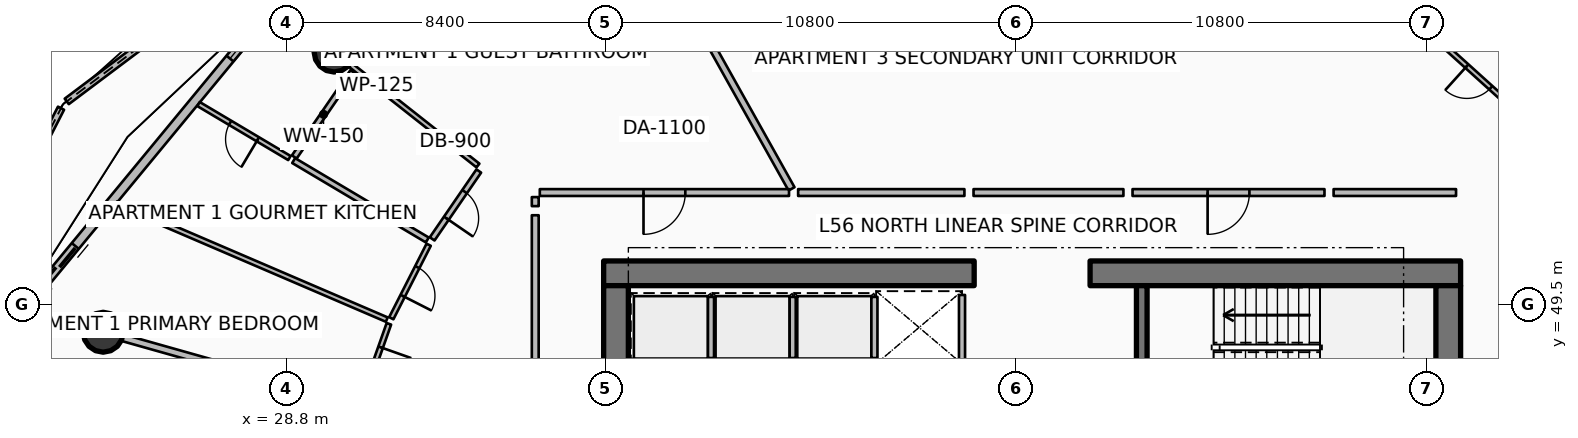
"""IFC4 building model, lengths in metres.
Left out: names, types, materials, properties, quantities, classifications, styles, units other than length and angle.
Written with IfcOpenShell. Run it as: python <this file> out.ifc"""

import sys

from ifc_helpers import new_model, si_unit, direction, frame, frame_2d, origin, origin_2d, place, context, subcontext, project, spatial, polyline, rectangle, circle, outline, extrude, element, fill, save


model = new_model("IFC4")
c1 = context("Model", 3, precision=1e-05, world=origin(), true_north=direction((0.0, 1.0)))
c2 = subcontext(c1, "Body", "Model", "MODEL_VIEW")
j1 = project(units=[si_unit("LENGTHUNIT", "METRE"), si_unit("PLANEANGLEUNIT", "RADIAN")], contexts=[c1])
p1 = place(None, origin())
s1 = spatial("IfcSite", under=j1, at=p1, CompositionType="ELEMENT")
p2 = place(p1, origin())
s2 = spatial("IfcBuilding", under=s1, at=p2, CompositionType="ELEMENT")
p3 = place(p2, frame((0.0, 0.0, 221.55)))
s3 = spatial("IfcBuildingStorey", under=s2, at=p3, CompositionType="ELEMENT", Elevation=221.55)
for number, where, z_axis, x_axis in (
    (1, (37.15, 50.325, 0.0), (0.0, 0.0, 1.0), (1.0, 0.0, 0.0)),
    (2, (49.95, 50.325, 0.0), (0.0, 0.0, 1.0), (1.0, 0.0, 0.0)),
):
    element("IfcWall", number, at=place(p3, frame(where, z_axis=z_axis, x_axis=x_axis)), inside=s3, PredefinedType="SHEAR", context=c2, shape_type="SweptSolid", body=[
        extrude(rectangle(XDim=9.75, YDim=0.65, at=frame_2d((4.875, 0.0))), origin(), (0.0, 0.0, 1.0), 3.75),
    ])
for number, where, z_axis, x_axis in (
    (3, (37.475, 34.0, 0.0), (0.0, 0.0, 1.0), (0.0, 1.0, 0.0)),
    (4, (59.375, 34.0, 0.0), (0.0, 0.0, 1.0), (0.0, 1.0, 0.0)),
):
    element("IfcWall", number, at=place(p3, frame(where, z_axis=z_axis, x_axis=x_axis)), inside=s3, PredefinedType="SHEAR", context=c2, shape_type="SweptSolid", body=[
        extrude(rectangle(XDim=16.0, YDim=0.65, at=frame_2d((8.0, 0.0))), origin(), (0.0, 0.0, 1.0), 3.75),
    ])
p4 = place(p3, frame((51.31, 46.5, 0.0), z_axis=(0.0, 0.0, 1.0), x_axis=(0.0, 1.0, 0.0)))
e5 = element("IfcWall", 5, at=p4, inside=s3, PredefinedType="SHEAR", context=c2, shape_type="SweptSolid", body=[
    extrude(rectangle(XDim=3.5, YDim=0.28, at=frame_2d((1.75, 0.0))), origin(), (0.0, 0.0, 1.0), 3.75),
])
p5 = place(p3, frame((30.056, 56.146, 0.0), z_axis=(-0.208518335243, 0.164359117207, 0.964109010672), x_axis=(-0.619039399449, -0.785359931452, 0.0)))
e6 = element("IfcColumn", 6, at=p5, inside=s3, PredefinedType="COLUMN", context=c2, shape_type="SweptSolid", body=[
    extrude(circle(Radius=0.525, at=origin_2d()), origin(), (0.0, 0.0, 1.0), 3.599),
])
p6 = place(p3, frame((23.98, 48.774, 0.0), z_axis=(-0.277251706749, 0.078156009679, 0.957613246178), x_axis=(-0.271321276561, -0.962488838837, 0.0)))
e7 = element("IfcColumn", 7, at=p6, inside=s3, PredefinedType="COLUMN", context=c2, shape_type="SweptSolid", body=[
    extrude(circle(Radius=0.525, at=origin_2d()), origin(), (0.0, 0.0, 1.0), 3.624),
])
p7 = place(p3, frame((31.432, 61.16, 0.0), z_axis=(0.0, 0.0, 1.0), x_axis=(-0.799768695593, -0.600308282093, 0.0)))
e8 = element("IfcWall", 8, at=p7, inside=s3, PredefinedType="PARAPET", context=c2, shape_type="SweptSolid", body=[
    extrude(outline(polyline([(0.0, 0.0), (10.515, 0.0), (10.515, 1.348), (5.258, 1.182), (0.0, 1.12), (0.0, 0.0)])), frame((0.0, 0.09, 0.0), z_axis=(0.0, -1.0, 0.0), x_axis=(1.0, 0.0, 0.0)), (0.0, 0.0, 1.0), 0.18),
])
p8 = place(p3, frame((22.871, 54.669, 0.0), z_axis=(0.0, 0.0, 1.0), x_axis=(-0.456201330326, -0.889876590437, 0.0)))
e9 = element("IfcWall", 9, at=p8, inside=s3, PredefinedType="PARAPET", context=c2, shape_type="SweptSolid", body=[
    extrude(outline(polyline([(0.0, 0.0), (11.347, 0.0), (11.347, 1.747), (5.674, 1.562), (0.0, 1.348), (0.0, 0.0)])), frame((0.0, 0.09, 0.0), z_axis=(0.0, -1.0, 0.0), x_axis=(1.0, 0.0, 0.0)), (0.0, 0.0, 1.0), 0.18),
])
p9 = place(p3, frame((28.515, 57.424, 0.0), z_axis=(0.0, 0.0, 1.0), x_axis=(-0.636759394418, -0.771062561418, 0.0)))
e10 = element("IfcWall", 10, at=p9, inside=s3, PredefinedType="SOLIDWALL", context=c2, shape_type="SweptSolid", body=[
    extrude(rectangle(XDim=10.494, YDim=0.24, at=frame_2d((5.247, 0.0))), origin(), (0.0, 0.0, 1.0), 2.42),
])
p10 = place(p9, frame((8.274, 0.0, 0.0)))
e11 = element("IfcOpeningElement", 11, at=p10, cuts=e10, PredefinedType="OPENING", context=c2, shape_type="SweptSolid", body=[
    extrude(rectangle(XDim=1.45, YDim=2.15, at=frame_2d((0.725, 1.075))), frame((0.0, 0.13, 0.0), z_axis=(0.0, -1.0, 0.0), x_axis=(1.0, 0.0, 0.0)), (0.0, 0.0, 1.0), 0.26),
])
p11 = place(p9, frame((0.28, 0.0, 0.65)))
e12 = element("IfcOpeningElement", 12, at=p11, cuts=e10, PredefinedType="OPENING", context=c2, shape_type="SweptSolid", body=[
    extrude(rectangle(XDim=1.6, YDim=1.5, at=frame_2d((0.8, 0.75))), frame((0.0, 0.13, 0.0), z_axis=(0.0, -1.0, 0.0), x_axis=(1.0, 0.0, 0.0)), (0.0, 0.0, 1.0), 0.26),
])
p12 = place(p3, frame((39.975, 47.995, 0.0), z_axis=(0.0, 0.0, 1.0), x_axis=(-1.0, 0.0, 0.0)))
e13 = element("IfcWall", 13, at=p12, inside=s3, PredefinedType="PARTITIONING", context=c2, shape_type="SweptSolid", body=[
    extrude(rectangle(XDim=2.11, YDim=0.16, at=frame_2d((1.055, 0.0))), origin(), (0.0, 0.0, 1.0), 3.47),
])
p13 = place(p12, frame((0.505, 0.0, 0.0)))
e14 = element("IfcOpeningElement", 14, at=p13, cuts=e13, PredefinedType="OPENING", context=c2, shape_type="SweptSolid", body=[
    extrude(rectangle(XDim=1.1, YDim=2.1, at=frame_2d((0.55, 1.05))), frame((0.0, 0.09, 0.0), z_axis=(0.0, -1.0, 0.0), x_axis=(1.0, 0.0, 0.0)), (0.0, 0.0, 1.0), 0.18),
])
p14 = place(p3, frame((39.975, 48.095, 0.0), z_axis=(0.0, 0.0, 1.0), x_axis=(0.0, 1.0, 0.0)))
e15 = element("IfcWall", 15, at=p14, inside=s3, PredefinedType="PARTITIONING", context=c2, shape_type="SweptSolid", body=[
    extrude(rectangle(XDim=1.61, YDim=0.16, at=frame_2d((0.805, 0.0))), origin(), (0.0, 0.0, 1.0), 3.47),
])
p15 = place(p3, frame((42.125, 47.995, 0.0), z_axis=(0.0, 0.0, 1.0), x_axis=(-1.0, 0.0, 0.0)))
e16 = element("IfcWall", 16, at=p15, inside=s3, PredefinedType="PARTITIONING", context=c2, shape_type="SweptSolid", body=[
    extrude(rectangle(XDim=2.11, YDim=0.16, at=frame_2d((1.055, 0.0))), origin(), (0.0, 0.0, 1.0), 3.47),
])
p16 = place(p15, frame((0.505, 0.0, 0.0)))
e17 = element("IfcOpeningElement", 17, at=p16, cuts=e16, PredefinedType="OPENING", context=c2, shape_type="SweptSolid", body=[
    extrude(rectangle(XDim=1.1, YDim=2.1, at=frame_2d((0.55, 1.05))), frame((0.0, 0.09, 0.0), z_axis=(0.0, -1.0, 0.0), x_axis=(1.0, 0.0, 0.0)), (0.0, 0.0, 1.0), 0.18),
])
p17 = place(p3, frame((42.125, 48.095, 0.0), z_axis=(0.0, 0.0, 1.0), x_axis=(0.0, 1.0, 0.0)))
e18 = element("IfcWall", 18, at=p17, inside=s3, PredefinedType="PARTITIONING", context=c2, shape_type="SweptSolid", body=[
    extrude(rectangle(XDim=1.61, YDim=0.16, at=frame_2d((0.805, 0.0))), origin(), (0.0, 0.0, 1.0), 3.47),
])
p18 = place(p3, frame((44.275, 47.995, 0.0), z_axis=(0.0, 0.0, 1.0), x_axis=(-1.0, 0.0, 0.0)))
e19 = element("IfcWall", 19, at=p18, inside=s3, PredefinedType="PARTITIONING", context=c2, shape_type="SweptSolid", body=[
    extrude(rectangle(XDim=2.11, YDim=0.16, at=frame_2d((1.055, 0.0))), origin(), (0.0, 0.0, 1.0), 3.47),
])
p19 = place(p18, frame((0.505, 0.0, 0.0)))
e20 = element("IfcOpeningElement", 20, at=p19, cuts=e19, PredefinedType="OPENING", context=c2, shape_type="SweptSolid", body=[
    extrude(rectangle(XDim=1.1, YDim=2.1, at=frame_2d((0.55, 1.05))), frame((0.0, 0.09, 0.0), z_axis=(0.0, -1.0, 0.0), x_axis=(1.0, 0.0, 0.0)), (0.0, 0.0, 1.0), 0.18),
])
p20 = place(p3, frame((44.275, 48.095, 0.0), z_axis=(0.0, 0.0, 1.0), x_axis=(0.0, 1.0, 0.0)))
e21 = element("IfcWall", 21, at=p20, inside=s3, PredefinedType="PARTITIONING", context=c2, shape_type="SweptSolid", body=[
    extrude(rectangle(XDim=1.61, YDim=0.16, at=frame_2d((0.805, 0.0))), origin(), (0.0, 0.0, 1.0), 3.47),
])
p21 = place(p3, frame((46.58, 48.045, 0.0), z_axis=(0.0, 0.0, 1.0), x_axis=(0.0, 1.0, 0.0)))
e22 = element("IfcWall", 22, at=p21, inside=s3, PredefinedType="PARTITIONING", context=c2, shape_type="SweptSolid", body=[
    extrude(rectangle(XDim=1.71, YDim=0.16, at=frame_2d((0.855, 0.0))), origin(), (0.0, 0.0, 1.0), 3.47),
])
p22 = place(p3, frame((42.094, 52.546, 0.0), z_axis=(0.0, 0.0, 1.0), x_axis=(-0.488614041717, 0.872500039104, 0.0)))
e23 = element("IfcWall", 23, at=p22, inside=s3, PredefinedType="PARTITIONING", context=c2, shape_type="SweptSolid", body=[
    extrude(rectangle(XDim=10.448, YDim=0.18, at=frame_2d((5.224, 0.0))), origin(), (0.0, 0.0, 1.0), 2.427),
])
p23 = place(p3, frame((35.244, 45.598, 0.0), z_axis=(0.0, 0.0, 1.0), x_axis=(-0.962456561262, 0.271435752405, 0.0)))
e24 = element("IfcWall", 24, at=p23, inside=s3, PredefinedType="PARTITIONING", context=c2, shape_type="SweptSolid", body=[
    extrude(rectangle(XDim=13.777, YDim=0.18, at=frame_2d((6.888, 0.0))), origin(), (0.0, 0.0, 1.0), 2.427),
])
p24 = place(p3, frame((42.028, 52.45, 0.0), z_axis=(0.0, 0.0, 1.0), x_axis=(-1.0, 0.0, 0.0)))
e25 = element("IfcWall", 25, at=p24, inside=s3, PredefinedType="PARTITIONING", context=c2, shape_type="SweptSolid", body=[
    extrude(rectangle(XDim=6.558, YDim=0.18, at=frame_2d((3.279, 0.0))), origin(), (0.0, 0.0, 1.0), 2.427),
])
p25 = place(p24, frame((2.729, 0.0, 0.0)))
e26 = element("IfcOpeningElement", 26, at=p25, cuts=e25, PredefinedType="OPENING", context=c2, shape_type="SweptSolid", body=[
    extrude(rectangle(XDim=1.1, YDim=2.1, at=frame_2d((0.55, 1.05))), frame((0.0, 0.1, 0.0), z_axis=(0.0, -1.0, 0.0), x_axis=(1.0, 0.0, 0.0)), (0.0, 0.0, 1.0), 0.2),
])
p26 = place(p3, frame((35.35, 52.33, 0.0), z_axis=(0.0, 0.0, 1.0), x_axis=(0.0, -1.0, 0.0)))
e27 = element("IfcWall", 27, at=p26, inside=s3, PredefinedType="PARTITIONING", context=c2, shape_type="SweptSolid", body=[
    extrude(rectangle(XDim=0.238, YDim=0.18, at=frame_2d((0.119, 0.0))), origin(), (0.0, 0.0, 1.0), 2.427),
])
p27 = place(p3, frame((35.35, 51.853, 0.0), z_axis=(0.0, 0.0, 1.0), x_axis=(0.0, -1.0, 0.0)))
e28 = element("IfcWall", 28, at=p27, inside=s3, PredefinedType="PARTITIONING", context=c2, shape_type="SweptSolid", body=[
    extrude(rectangle(XDim=6.165, YDim=0.18, at=frame_2d((3.083, 0.0))), origin(), (0.0, 0.0, 1.0), 2.427),
])
p28 = place(p3, frame((33.842, 53.161, 0.0), z_axis=(0.0, 0.0, 1.0), x_axis=(-0.785311801239, 0.619100456173, 0.0)))
e29 = element("IfcWall", 29, at=p28, inside=s3, PredefinedType="PARTITIONING", context=c2, shape_type="SweptSolid", body=[
    extrude(rectangle(XDim=6.799, YDim=0.125, at=frame_2d((3.4, 0.0))), origin(), (0.0, 0.0, 1.0), 2.427),
])
p29 = place(p3, frame((33.864, 53.017, 0.0), z_axis=(0.0, 0.0, 1.0), x_axis=(-0.56614137875, -0.824308157953, 0.0)))
e30 = element("IfcWall", 30, at=p29, inside=s3, PredefinedType="PARTITIONING", context=c2, shape_type="SweptSolid", body=[
    extrude(rectangle(XDim=2.167, YDim=0.15, at=frame_2d((1.083, 0.0))), origin(), (0.0, 0.0, 1.0), 2.427),
])
p30 = place(p29, frame((0.658, 0.0, 0.0)))
e31 = element("IfcOpeningElement", 31, at=p30, cuts=e30, PredefinedType="OPENING", context=c2, shape_type="SweptSolid", body=[
    extrude(rectangle(XDim=0.85, YDim=2.06, at=frame_2d((0.425, 1.03))), frame((0.0, 0.085, 0.0), z_axis=(0.0, -1.0, 0.0), x_axis=(1.0, 0.0, 0.0)), (0.0, 0.0, 1.0), 0.17),
])
p31 = place(p3, frame((30.55, 55.629, 0.0), z_axis=(0.0, 0.0, 1.0), x_axis=(-0.566136620745, -0.824311425768, 0.0)))
e32 = element("IfcWall", 32, at=p31, inside=s3, PredefinedType="PARTITIONING", context=c2, shape_type="SweptSolid", body=[
    extrude(rectangle(XDim=2.721, YDim=0.15, at=frame_2d((1.361, 0.0))), origin(), (0.0, 0.0, 1.0), 2.427),
])
p32 = place(p3, frame((32.509, 51.202, 0.0), z_axis=(0.0, 0.0, 1.0), x_axis=(-0.859744174922, 0.510724929573, 0.0)))
e33 = element("IfcWall", 33, at=p32, inside=s3, PredefinedType="PARTITIONING", context=c2, shape_type="SweptSolid", body=[
    extrude(rectangle(XDim=4.09, YDim=0.15, at=frame_2d((2.045, 0.0))), origin(), (0.0, 0.0, 1.0), 2.91),
])
p33 = place(p3, frame((28.881, 53.358, 0.0), z_axis=(0.0, 0.0, 1.0), x_axis=(-0.859746342612, 0.51072128051, 0.0)))
e34 = element("IfcWall", 34, at=p33, inside=s3, PredefinedType="PARTITIONING", context=c2, shape_type="SweptSolid", body=[
    extrude(rectangle(XDim=2.781, YDim=0.125, at=frame_2d((1.391, 0.0))), origin(), (0.0, 0.0, 1.0), 2.445),
])
p34 = place(p33, frame((0.966, 0.0, 0.0)))
e35 = element("IfcOpeningElement", 35, at=p34, cuts=e34, PredefinedType="OPENING", context=c2, shape_type="SweptSolid", body=[
    extrude(rectangle(XDim=0.85, YDim=2.06, at=frame_2d((0.425, 1.03))), frame((0.0, 0.073, 0.0), z_axis=(0.0, -1.0, 0.0), x_axis=(1.0, 0.0, 0.0)), (0.0, 0.0, 1.0), 0.145),
])
p35 = place(p3, frame((31.443, 49.107, 0.0), z_axis=(0.0, 0.0, 1.0), x_axis=(-0.918923160155, 0.394436592789, 0.0)))
e36 = element("IfcWall", 36, at=p35, inside=s3, PredefinedType="PARTITIONING", context=c2, shape_type="SweptSolid", body=[
    extrude(rectangle(XDim=7.746, YDim=0.125, at=frame_2d((3.873, 0.0))), origin(), (0.0, 0.0, 1.0), 2.445),
])
p36 = place(p3, frame((32.546, 51.076, 0.0), z_axis=(0.0, 0.0, 1.0), x_axis=(-0.453549779993, -0.891230944855, 0.0)))
e37 = element("IfcWall", 37, at=p36, inside=s3, PredefinedType="PARTITIONING", context=c2, shape_type="SweptSolid", body=[
    extrude(rectangle(XDim=2.169, YDim=0.125, at=frame_2d((1.084, 0.0))), origin(), (0.0, 0.0, 1.0), 2.91),
])
p37 = place(p36, frame((0.66, 0.0, 0.0)))
e38 = element("IfcOpeningElement", 38, at=p37, cuts=e37, PredefinedType="OPENING", context=c2, shape_type="SweptSolid", body=[
    extrude(rectangle(XDim=0.85, YDim=2.06, at=frame_2d((0.425, 1.03))), frame((0.0, 0.073, 0.0), z_axis=(0.0, -1.0, 0.0), x_axis=(1.0, 0.0, 0.0)), (0.0, 0.0, 1.0), 0.145),
])
p38 = place(p3, frame((31.499, 48.996, 0.0), z_axis=(0.0, 0.0, 1.0), x_axis=(-0.333577104371, -0.942722820048, 0.0)))
e39 = element("IfcWall", 39, at=p38, inside=s3, PredefinedType="PARTITIONING", context=c2, shape_type="SweptSolid", body=[
    extrude(rectangle(XDim=2.159, YDim=0.125, at=frame_2d((1.08, 0.0))), origin(), (0.0, 0.0, 1.0), 2.427),
])
p39 = place(p38, frame((0.655, 0.0, 0.0)))
e40 = element("IfcOpeningElement", 40, at=p39, cuts=e39, PredefinedType="OPENING", context=c2, shape_type="SweptSolid", body=[
    extrude(rectangle(XDim=0.85, YDim=2.06, at=frame_2d((0.425, 1.03))), frame((0.0, 0.073, 0.0), z_axis=(0.0, -1.0, 0.0), x_axis=(1.0, 0.0, 0.0)), (0.0, 0.0, 1.0), 0.145),
])
p40 = place(p3, frame((56.118, 52.45, 0.0), z_axis=(0.0, 0.0, 1.0), x_axis=(-1.0, 0.0, 0.0)))
e41 = element("IfcWall", 41, at=p40, inside=s3, PredefinedType="PARTITIONING", context=c2, shape_type="SweptSolid", body=[
    extrude(rectangle(XDim=5.051, YDim=0.18, at=frame_2d((2.525, 0.0))), origin(), (0.0, 0.0, 1.0), 2.427),
])
p41 = place(p40, frame((1.975, 0.0, 0.0)))
e42 = element("IfcOpeningElement", 42, at=p41, cuts=e41, PredefinedType="OPENING", context=c2, shape_type="SweptSolid", body=[
    extrude(rectangle(XDim=1.1, YDim=2.1, at=frame_2d((0.55, 1.05))), frame((0.0, 0.1, 0.0), z_axis=(0.0, -1.0, 0.0), x_axis=(1.0, 0.0, 0.0)), (0.0, 0.0, 1.0), 0.2),
])
p42 = place(p3, frame((59.58, 52.45, 0.0), z_axis=(0.0, 0.0, 1.0), x_axis=(-1.0, 0.0, 0.0)))
e43 = element("IfcWall", 43, at=p42, inside=s3, PredefinedType="PARTITIONING", context=c2, shape_type="SweptSolid", body=[
    extrude(rectangle(XDim=3.222, YDim=0.18, at=frame_2d((1.611, 0.0))), origin(), (0.0, 0.0, 1.0), 2.427),
])
p43 = place(p3, frame((61.023, 54.731, 0.0), z_axis=(0.0, 0.0, 1.0), x_axis=(-0.742261355739, 0.670110498184, 0.0)))
e44 = element("IfcWall", 44, at=p43, inside=s3, PredefinedType="PARTITIONING", context=c2, shape_type="SweptSolid", body=[
    extrude(rectangle(XDim=2.271, YDim=0.125, at=frame_2d((1.135, 0.0))), origin(), (0.0, 0.0, 1.0), 2.427),
])
p44 = place(p43, frame((0.71, 0.0, 0.0)))
e45 = element("IfcOpeningElement", 45, at=p44, cuts=e44, PredefinedType="OPENING", context=c2, shape_type="SweptSolid", body=[
    extrude(rectangle(XDim=0.85, YDim=2.06, at=frame_2d((0.425, 1.03))), frame((0.0, 0.073, 0.0), z_axis=(0.0, -1.0, 0.0), x_axis=(1.0, 0.0, 0.0)), (0.0, 0.0, 1.0), 0.145),
])
p45 = place(p3, frame((50.827, 52.45, 0.0), z_axis=(0.0, 0.0, 1.0), x_axis=(-1.0, 0.0, 0.0)))
e46 = element("IfcWall", 46, at=p45, inside=s3, PredefinedType="PARTITIONING", context=c2, shape_type="SweptSolid", body=[
    extrude(rectangle(XDim=3.944, YDim=0.18, at=frame_2d((1.972, 0.0))), origin(), (0.0, 0.0, 1.0), 2.427),
])
p46 = place(p3, frame((46.643, 52.45, 0.0), z_axis=(0.0, 0.0, 1.0), x_axis=(-1.0, 0.0, 0.0)))
e47 = element("IfcWall", 47, at=p46, inside=s3, PredefinedType="PARTITIONING", context=c2, shape_type="SweptSolid", body=[
    extrude(rectangle(XDim=4.376, YDim=0.18, at=frame_2d((2.188, 0.0))), origin(), (0.0, 0.0, 1.0), 2.427),
])
p47 = place(p10, origin())
e48 = element("IfcDoor", 48, at=p47, inside=s3, OperationType="DOUBLE_DOOR_SLIDING", PredefinedType="DOOR", context=c2, shape_type="SweptSolid", body=[
    extrude(rectangle(XDim=1.45, YDim=2.15, at=frame_2d((0.725, 1.075))), frame((0.0, 0.025, 0.0), z_axis=(0.0, -1.0, 0.0), x_axis=(1.0, 0.0, 0.0)), (0.0, 0.0, 1.0), 0.05),
])
fill(e11, e48)
p48 = place(p11, origin())
e49 = element("IfcWindow", 49, at=p48, inside=s3, PartitioningType="SINGLE_PANEL", PredefinedType="WINDOW", context=c2, shape_type="SweptSolid", body=[
    extrude(rectangle(XDim=1.6, YDim=1.5, at=frame_2d((0.8, 0.75))), frame((0.0, 0.03, 0.0), z_axis=(0.0, -1.0, 0.0), x_axis=(1.0, 0.0, 0.0)), (0.0, 0.0, 1.0), 0.06),
])
fill(e12, e49)
p49 = place(p25, origin())
e50 = element("IfcDoor", 50, at=p49, inside=s3, OperationType="SINGLE_SWING_RIGHT", PredefinedType="DOOR", context=c2, shape_type="SweptSolid", body=[
    extrude(rectangle(XDim=1.1, YDim=2.1, at=frame_2d((0.55, 1.05))), frame((0.0, 0.025, 0.0), z_axis=(0.0, -1.0, 0.0), x_axis=(1.0, 0.0, 0.0)), (0.0, 0.0, 1.0), 0.05),
])
fill(e26, e50)
p50 = place(p30, origin())
e51 = element("IfcDoor", 51, at=p50, inside=s3, OperationType="SINGLE_SWING_RIGHT", PredefinedType="DOOR", context=c2, shape_type="SweptSolid", body=[
    extrude(rectangle(XDim=0.85, YDim=2.06, at=frame_2d((0.425, 1.03))), frame((0.0, 0.025, 0.0), z_axis=(0.0, -1.0, 0.0), x_axis=(1.0, 0.0, 0.0)), (0.0, 0.0, 1.0), 0.05),
])
fill(e31, e51)
p51 = place(p34, origin())
e52 = element("IfcDoor", 52, at=p51, inside=s3, OperationType="SINGLE_SWING_LEFT", PredefinedType="DOOR", context=c2, shape_type="SweptSolid", body=[
    extrude(rectangle(XDim=0.85, YDim=2.06, at=frame_2d((0.425, 1.03))), frame((0.0, 0.025, 0.0), z_axis=(0.0, -1.0, 0.0), x_axis=(1.0, 0.0, 0.0)), (0.0, 0.0, 1.0), 0.05),
])
fill(e35, e52)
p52 = place(p37, origin())
e53 = element("IfcDoor", 53, at=p52, inside=s3, OperationType="SINGLE_SWING_RIGHT", PredefinedType="DOOR", context=c2, shape_type="SweptSolid", body=[
    extrude(rectangle(XDim=0.85, YDim=2.06, at=frame_2d((0.425, 1.03))), frame((0.0, 0.025, 0.0), z_axis=(0.0, -1.0, 0.0), x_axis=(1.0, 0.0, 0.0)), (0.0, 0.0, 1.0), 0.05),
])
fill(e38, e53)
p53 = place(p39, origin())
e54 = element("IfcDoor", 54, at=p53, inside=s3, OperationType="SINGLE_SWING_LEFT", PredefinedType="DOOR", context=c2, shape_type="SweptSolid", body=[
    extrude(rectangle(XDim=0.85, YDim=2.06, at=frame_2d((0.425, 1.03))), frame((0.0, 0.025, 0.0), z_axis=(0.0, -1.0, 0.0), x_axis=(1.0, 0.0, 0.0)), (0.0, 0.0, 1.0), 0.05),
])
fill(e40, e54)
p54 = place(p41, origin())
e55 = element("IfcDoor", 55, at=p54, inside=s3, OperationType="SINGLE_SWING_RIGHT", PredefinedType="DOOR", context=c2, shape_type="SweptSolid", body=[
    extrude(rectangle(XDim=1.1, YDim=2.1, at=frame_2d((0.55, 1.05))), frame((0.0, 0.025, 0.0), z_axis=(0.0, -1.0, 0.0), x_axis=(1.0, 0.0, 0.0)), (0.0, 0.0, 1.0), 0.05),
])
fill(e42, e55)
p55 = place(p44, origin())
e56 = element("IfcDoor", 56, at=p55, inside=s3, OperationType="SINGLE_SWING_RIGHT", PredefinedType="DOOR", context=c2, shape_type="SweptSolid", body=[
    extrude(rectangle(XDim=0.85, YDim=2.06, at=frame_2d((0.425, 1.03))), frame((0.0, 0.025, 0.0), z_axis=(0.0, -1.0, 0.0), x_axis=(1.0, 0.0, 0.0)), (0.0, 0.0, 1.0), 0.05),
])
fill(e45, e56)
save(model, sys.argv[1])
